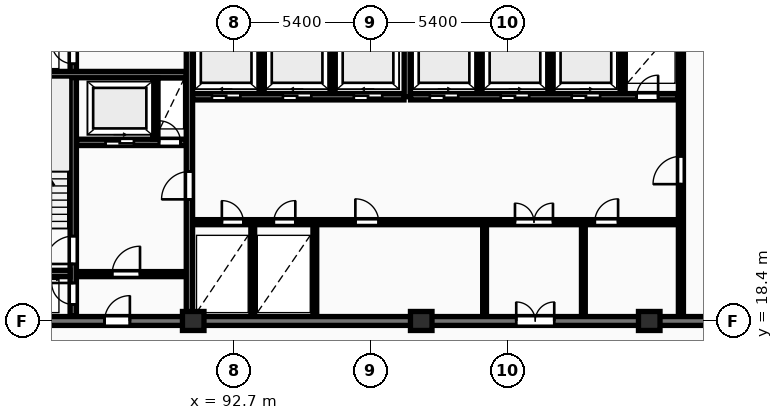
"""IFC4 building model, lengths in metres.
Left out: names, types, materials, properties, quantities, classifications, styles, units other than length and angle.
Written with IfcOpenShell. Run it as: python <this file> out.ifc"""

import sys

from ifc_helpers import new_model, si_unit, direction, frame, frame_2d, origin, origin_2d, place, context, subcontext, project, spatial, rectangle, extrude, element, fill, save


model = new_model("IFC4")
c1 = context("Model", 3, precision=1e-05, world=origin(), true_north=direction((0.0, 1.0)))
c2 = subcontext(c1, "Body", "Model", "MODEL_VIEW")
j1 = project(units=[si_unit("LENGTHUNIT", "METRE"), si_unit("PLANEANGLEUNIT", "RADIAN")], contexts=[c1])
p1 = place(None, origin())
s1 = spatial("IfcSite", under=j1, at=p1, CompositionType="ELEMENT")
p2 = place(p1, origin())
s2 = spatial("IfcBuilding", under=s1, at=p2, CompositionType="ELEMENT")
p3 = place(p2, frame((0.0, 0.0, 93.8)))
s3 = spatial("IfcBuildingStorey", under=s2, at=p3, CompositionType="ELEMENT", Elevation=93.8)
for number, where, z_axis, x_axis in (
    (1, (91.1, 18.4, 0.0), (0.0, 0.0, 1.0), (1.0, 0.0, 0.0)),
    (2, (100.1, 18.4, 0.0), (0.0, 0.0, 1.0), (1.0, 0.0, 0.0)),
    (3, (109.1, 18.4, 0.0), (0.0, 0.0, 1.0), (1.0, 0.0, 0.0)),
):
    element("IfcColumn", number, at=place(p3, frame(where, z_axis=z_axis, x_axis=x_axis)), inside=s3, PredefinedType="COLUMN", context=c2, shape_type="SweptSolid", body=[
        extrude(rectangle(XDim=0.85, YDim=0.75, at=origin_2d()), origin(), (0.0, 0.0, 1.0), 3.25),
    ])
p4 = place(p3, frame((81.925, 18.4, 0.0), z_axis=(0.0, 0.0, 1.0), x_axis=(1.0, 0.0, 0.0)))
e4 = element("IfcWall", 4, at=p4, inside=s3, PredefinedType="SHEAR", context=c2, shape_type="SweptSolid", body=[
    extrude(rectangle(XDim=36.265, YDim=0.35, at=frame_2d((18.132, 0.0))), origin(), (0.0, 0.0, 1.0), 3.25),
])
p5 = place(p4, frame((5.675, 0.0, 0.0)))
e5 = element("IfcOpeningElement", 5, at=p5, cuts=e4, PredefinedType="OPENING", context=c2, shape_type="SweptSolid", body=[
    extrude(rectangle(XDim=1.0, YDim=2.15, at=frame_2d((0.5, 1.075))), frame((0.0, 0.185, 0.0), z_axis=(0.0, -1.0, 0.0), x_axis=(1.0, 0.0, 0.0)), (0.0, 0.0, 1.0), 0.37),
])
p6 = place(p4, frame((21.925, 0.0, 0.0)))
e6 = element("IfcOpeningElement", 6, at=p6, cuts=e4, PredefinedType="OPENING", context=c2, shape_type="SweptSolid", body=[
    extrude(rectangle(XDim=1.5, YDim=2.2, at=frame_2d((0.75, 1.1))), frame((0.0, 0.185, 0.0), z_axis=(0.0, -1.0, 0.0), x_axis=(1.0, 0.0, 0.0)), (0.0, 0.0, 1.0), 0.37),
])
p7 = place(p4, frame((29.875, 0.0, 0.0)))
e7 = element("IfcOpeningElement", 7, at=p7, cuts=e4, PredefinedType="OPENING", context=c2, shape_type="SweptSolid", body=[
    extrude(rectangle(XDim=1.0, YDim=2.15, at=frame_2d((0.5, 1.075))), frame((0.0, 0.185, 0.0), z_axis=(0.0, -1.0, 0.0), x_axis=(1.0, 0.0, 0.0)), (0.0, 0.0, 1.0), 0.37),
])
p8 = place(p3, frame((86.365, 18.6, 0.0), z_axis=(0.0, 0.0, 1.0), x_axis=(0.0, 1.0, 0.0)))
e8 = element("IfcWall", 8, at=p8, inside=s3, PredefinedType="SHEAR", context=c2, shape_type="SweptSolid", body=[
    extrude(rectangle(XDim=11.6, YDim=0.25, at=frame_2d((5.8, 0.0))), origin(), (0.0, 0.0, 1.0), 3.25),
])
p9 = place(p8, frame((0.45, 0.0, 0.0)))
e9 = element("IfcOpeningElement", 9, at=p9, cuts=e8, PredefinedType="OPENING", context=c2, shape_type="SweptSolid", body=[
    extrude(rectangle(XDim=0.85, YDim=2.05, at=frame_2d((0.425, 1.025))), frame((0.0, 0.135, 0.0), z_axis=(0.0, -1.0, 0.0), x_axis=(1.0, 0.0, 0.0)), (0.0, 0.0, 1.0), 0.27),
])
p10 = place(p8, frame((2.05, 0.0, 0.0)))
e10 = element("IfcOpeningElement", 10, at=p10, cuts=e8, PredefinedType="OPENING", context=c2, shape_type="SweptSolid", body=[
    extrude(rectangle(XDim=1.1, YDim=2.1, at=frame_2d((0.55, 1.05))), frame((0.0, 0.135, 0.0), z_axis=(0.0, -1.0, 0.0), x_axis=(1.0, 0.0, 0.0)), (0.0, 0.0, 1.0), 0.27),
])
p11 = place(p8, frame((9.95, 0.0, 0.0)))
e11 = element("IfcOpeningElement", 11, at=p11, cuts=e8, PredefinedType="OPENING", context=c2, shape_type="SweptSolid", body=[
    extrude(rectangle(XDim=0.85, YDim=2.05, at=frame_2d((0.425, 1.025))), frame((0.0, 0.135, 0.0), z_axis=(0.0, -1.0, 0.0), x_axis=(1.0, 0.0, 0.0)), (0.0, 0.0, 1.0), 0.27),
])
p12 = place(p3, frame((83.0, 20.275, 0.0), z_axis=(0.0, 0.0, 1.0), x_axis=(1.0, 0.0, 0.0)))
e12 = element("IfcWall", 12, at=p12, inside=s3, PredefinedType="SHEAR", context=c2, shape_type="SweptSolid", body=[
    extrude(rectangle(XDim=3.24, YDim=0.25, at=frame_2d((1.62, 0.0))), origin(), (0.0, 0.0, 1.0), 3.25),
])
p13 = place(p3, frame((83.0, 28.125, 0.0), z_axis=(0.0, 0.0, 1.0), x_axis=(1.0, 0.0, 0.0)))
e13 = element("IfcWall", 13, at=p13, inside=s3, PredefinedType="SHEAR", context=c2, shape_type="SweptSolid", body=[
    extrude(rectangle(XDim=7.82, YDim=0.25, at=frame_2d((3.91, 0.0))), origin(), (0.0, 0.0, 1.0), 3.25),
])
p14 = place(p3, frame((86.5, 25.45, 0.0), z_axis=(0.0, 0.0, 1.0), x_axis=(1.0, 0.0, 0.0)))
e14 = element("IfcWall", 14, at=p14, inside=s3, PredefinedType="SHEAR", context=c2, shape_type="SweptSolid", body=[
    extrude(rectangle(XDim=4.32, YDim=0.25, at=frame_2d((2.16, 0.0))), origin(), (0.0, 0.0, 1.0), 3.25),
])
p15 = place(p14, frame((1.14, 0.0, 0.0)))
e15 = element("IfcOpeningElement", 15, at=p15, cuts=e14, PredefinedType="OPENING", context=c2, shape_type="SweptSolid", body=[
    extrude(rectangle(XDim=1.12, YDim=2.12, at=frame_2d((0.56, 1.06))), frame((0.0, 0.135, 0.0), z_axis=(0.0, -1.0, 0.0), x_axis=(1.0, 0.0, 0.0)), (0.0, 0.0, 1.0), 0.27),
])
p16 = place(p14, frame((3.25, 0.0, 0.0)))
e16 = element("IfcOpeningElement", 16, at=p16, cuts=e14, PredefinedType="OPENING", context=c2, shape_type="SweptSolid", body=[
    extrude(rectangle(XDim=0.85, YDim=2.05, at=frame_2d((0.425, 1.025))), frame((0.0, 0.135, 0.0), z_axis=(0.0, -1.0, 0.0), x_axis=(1.0, 0.0, 0.0)), (0.0, 0.0, 1.0), 0.27),
])
p17 = place(p3, frame((89.6, 25.58, 0.0), z_axis=(0.0, 0.0, 1.0), x_axis=(0.0, 1.0, 0.0)))
e17 = element("IfcWall", 17, at=p17, inside=s3, PredefinedType="PARTITIONING", context=c2, shape_type="SweptSolid", body=[
    extrude(rectangle(XDim=2.42, YDim=0.2, at=frame_2d((1.21, 0.0))), origin(), (0.0, 0.0, 1.0), 2.97),
])
p18 = place(p3, frame((86.5, 20.25, 0.0), z_axis=(0.0, 0.0, 1.0), x_axis=(1.0, 0.0, 0.0)))
e18 = element("IfcWall", 18, at=p18, inside=s3, PredefinedType="PARTITIONING", context=c2, shape_type="SweptSolid", body=[
    extrude(rectangle(XDim=4.32, YDim=0.2, at=frame_2d((2.16, 0.0))), origin(), (0.0, 0.0, 1.0), 2.97),
])
p19 = place(p18, frame((1.4, 0.0, 0.0)))
e19 = element("IfcOpeningElement", 19, at=p19, cuts=e18, PredefinedType="OPENING", context=c2, shape_type="SweptSolid", body=[
    extrude(rectangle(XDim=1.1, YDim=2.1, at=frame_2d((0.55, 1.05))), frame((0.0, 0.11, 0.0), z_axis=(0.0, -1.0, 0.0), x_axis=(1.0, 0.0, 0.0)), (0.0, 0.0, 1.0), 0.22),
])
p20 = place(p3, frame((90.95, 18.6, 0.0), z_axis=(0.0, 0.0, 1.0), x_axis=(0.0, 1.0, 0.0)))
e20 = element("IfcWall", 20, at=p20, inside=s3, PredefinedType="SHEAR", context=c2, shape_type="SweptSolid", body=[
    extrude(rectangle(XDim=11.6, YDim=0.25, at=frame_2d((5.8, 0.0))), origin(), (0.0, 0.0, 1.0), 3.25),
])
p21 = place(p20, frame((4.6, 0.0, 0.0)))
e21 = element("IfcOpeningElement", 21, at=p21, cuts=e20, PredefinedType="OPENING", context=c2, shape_type="SweptSolid", body=[
    extrude(rectangle(XDim=1.1, YDim=2.1, at=frame_2d((0.55, 1.05))), frame((0.0, 0.135, 0.0), z_axis=(0.0, -1.0, 0.0), x_axis=(1.0, 0.0, 0.0)), (0.0, 0.0, 1.0), 0.27),
])
for number, where, z_axis, x_axis in (
    (22, (93.8, 27.38, 0.0), (0.0, 0.0, 1.0), (0.0, 1.0, 0.0)),
    (23, (96.6, 27.38, 0.0), (0.0, 0.0, 1.0), (0.0, 1.0, 0.0)),
):
    element("IfcWall", number, at=place(p3, frame(where, z_axis=z_axis, x_axis=x_axis)), inside=s3, PredefinedType="PARTITIONING", context=c2, shape_type="SweptSolid", body=[
        extrude(rectangle(XDim=2.82, YDim=0.2, at=frame_2d((1.41, 0.0))), origin(), (0.0, 0.0, 1.0), 2.97),
    ])
p22 = place(p3, frame((91.08, 27.25, 0.0), z_axis=(0.0, 0.0, 1.0), x_axis=(1.0, 0.0, 0.0)))
e24 = element("IfcWall", 24, at=p22, inside=s3, PredefinedType="SHEAR", context=c2, shape_type="SweptSolid", body=[
    extrude(rectangle(XDim=8.34, YDim=0.25, at=frame_2d((4.17, 0.0))), origin(), (0.0, 0.0, 1.0), 3.25),
])
p23 = place(p22, frame((0.76, 0.0, 0.0)))
e25 = element("IfcOpeningElement", 25, at=p23, cuts=e24, PredefinedType="OPENING", context=c2, shape_type="SweptSolid", body=[
    extrude(rectangle(XDim=1.12, YDim=2.12, at=frame_2d((0.56, 1.06))), frame((0.0, 0.135, 0.0), z_axis=(0.0, -1.0, 0.0), x_axis=(1.0, 0.0, 0.0)), (0.0, 0.0, 1.0), 0.27),
])
p24 = place(p22, frame((3.56, 0.0, 0.0)))
e26 = element("IfcOpeningElement", 26, at=p24, cuts=e24, PredefinedType="OPENING", context=c2, shape_type="SweptSolid", body=[
    extrude(rectangle(XDim=1.12, YDim=2.12, at=frame_2d((0.56, 1.06))), frame((0.0, 0.135, 0.0), z_axis=(0.0, -1.0, 0.0), x_axis=(1.0, 0.0, 0.0)), (0.0, 0.0, 1.0), 0.27),
])
p25 = place(p22, frame((6.36, 0.0, 0.0)))
e27 = element("IfcOpeningElement", 27, at=p25, cuts=e24, PredefinedType="OPENING", context=c2, shape_type="SweptSolid", body=[
    extrude(rectangle(XDim=1.12, YDim=2.12, at=frame_2d((0.56, 1.06))), frame((0.0, 0.135, 0.0), z_axis=(0.0, -1.0, 0.0), x_axis=(1.0, 0.0, 0.0)), (0.0, 0.0, 1.0), 0.27),
])
p26 = place(p3, frame((99.55, 27.25, 0.0), z_axis=(0.0, 0.0, 1.0), x_axis=(0.0, 1.0, 0.0)))
e28 = element("IfcWall", 28, at=p26, inside=s3, PredefinedType="SHEAR", context=c2, shape_type="SweptSolid", body=[
    extrude(rectangle(XDim=2.95, YDim=0.25, at=frame_2d((1.475, 0.0))), origin(), (0.0, 0.0, 1.0), 3.25),
])
for number, where, z_axis, x_axis in (
    (29, (102.4, 27.38, 0.0), (0.0, 0.0, 1.0), (0.0, 1.0, 0.0)),
    (30, (105.2, 27.38, 0.0), (0.0, 0.0, 1.0), (0.0, 1.0, 0.0)),
    (31, (108.05, 27.38, 0.0), (0.0, 0.0, 1.0), (0.0, 1.0, 0.0)),
):
    element("IfcWall", number, at=place(p3, frame(where, z_axis=z_axis, x_axis=x_axis)), inside=s3, PredefinedType="PARTITIONING", context=c2, shape_type="SweptSolid", body=[
        extrude(rectangle(XDim=2.82, YDim=0.2, at=frame_2d((1.41, 0.0))), origin(), (0.0, 0.0, 1.0), 2.97),
    ])
p27 = place(p3, frame((99.68, 27.25, 0.0), z_axis=(0.0, 0.0, 1.0), x_axis=(1.0, 0.0, 0.0)))
e32 = element("IfcWall", 32, at=p27, inside=s3, PredefinedType="SHEAR", context=c2, shape_type="SweptSolid", body=[
    extrude(rectangle(XDim=10.54, YDim=0.25, at=frame_2d((5.27, 0.0))), origin(), (0.0, 0.0, 1.0), 3.25),
])
p28 = place(p27, frame((0.76, 0.0, 0.0)))
e33 = element("IfcOpeningElement", 33, at=p28, cuts=e32, PredefinedType="OPENING", context=c2, shape_type="SweptSolid", body=[
    extrude(rectangle(XDim=1.12, YDim=2.12, at=frame_2d((0.56, 1.06))), frame((0.0, 0.135, 0.0), z_axis=(0.0, -1.0, 0.0), x_axis=(1.0, 0.0, 0.0)), (0.0, 0.0, 1.0), 0.27),
])
p29 = place(p27, frame((3.56, 0.0, 0.0)))
e34 = element("IfcOpeningElement", 34, at=p29, cuts=e32, PredefinedType="OPENING", context=c2, shape_type="SweptSolid", body=[
    extrude(rectangle(XDim=1.12, YDim=2.12, at=frame_2d((0.56, 1.06))), frame((0.0, 0.135, 0.0), z_axis=(0.0, -1.0, 0.0), x_axis=(1.0, 0.0, 0.0)), (0.0, 0.0, 1.0), 0.27),
])
p30 = place(p27, frame((6.36, 0.0, 0.0)))
e35 = element("IfcOpeningElement", 35, at=p30, cuts=e32, PredefinedType="OPENING", context=c2, shape_type="SweptSolid", body=[
    extrude(rectangle(XDim=1.12, YDim=2.12, at=frame_2d((0.56, 1.06))), frame((0.0, 0.135, 0.0), z_axis=(0.0, -1.0, 0.0), x_axis=(1.0, 0.0, 0.0)), (0.0, 0.0, 1.0), 0.27),
])
p31 = place(p27, frame((8.92, 0.0, 0.0)))
e36 = element("IfcOpeningElement", 36, at=p31, cuts=e32, PredefinedType="OPENING", context=c2, shape_type="SweptSolid", body=[
    extrude(rectangle(XDim=0.85, YDim=2.05, at=frame_2d((0.425, 1.025))), frame((0.0, 0.135, 0.0), z_axis=(0.0, -1.0, 0.0), x_axis=(1.0, 0.0, 0.0)), (0.0, 0.0, 1.0), 0.27),
])
for number, where, z_axis, x_axis in (
    (37, (93.45, 18.6, 0.0), (0.0, 0.0, 1.0), (0.0, 1.0, 0.0)),
    (38, (95.9, 18.6, 0.0), (0.0, 0.0, 1.0), (0.0, 1.0, 0.0)),
    (39, (102.6, 18.6, 0.0), (0.0, 0.0, 1.0), (0.0, 1.0, 0.0)),
    (40, (106.5, 18.6, 0.0), (0.0, 0.0, 1.0), (0.0, 1.0, 0.0)),
):
    element("IfcWall", number, at=place(p3, frame(where, z_axis=z_axis, x_axis=x_axis)), inside=s3, PredefinedType="PARTITIONING", context=c2, shape_type="SweptSolid", body=[
        extrude(rectangle(XDim=3.6, YDim=0.15, at=frame_2d((1.8, 0.0))), origin(), (0.0, 0.0, 1.0), 2.97),
    ])
p32 = place(p3, frame((91.08, 22.3, 0.0), z_axis=(0.0, 0.0, 1.0), x_axis=(1.0, 0.0, 0.0)))
e41 = element("IfcWall", 41, at=p32, inside=s3, PredefinedType="PARTITIONING", context=c2, shape_type="SweptSolid", body=[
    extrude(rectangle(XDim=19.14, YDim=0.2, at=frame_2d((9.57, 0.0))), origin(), (0.0, 0.0, 1.0), 2.97),
])
p33 = place(p32, frame((1.15, 0.0, 0.0)))
e42 = element("IfcOpeningElement", 42, at=p33, cuts=e41, PredefinedType="OPENING", context=c2, shape_type="SweptSolid", body=[
    extrude(rectangle(XDim=0.85, YDim=2.05, at=frame_2d((0.425, 1.025))), frame((0.0, 0.11, 0.0), z_axis=(0.0, -1.0, 0.0), x_axis=(1.0, 0.0, 0.0)), (0.0, 0.0, 1.0), 0.22),
])
p34 = place(p32, frame((3.2, 0.0, 0.0)))
e43 = element("IfcOpeningElement", 43, at=p34, cuts=e41, PredefinedType="OPENING", context=c2, shape_type="SweptSolid", body=[
    extrude(rectangle(XDim=0.85, YDim=2.05, at=frame_2d((0.425, 1.025))), frame((0.0, 0.11, 0.0), z_axis=(0.0, -1.0, 0.0), x_axis=(1.0, 0.0, 0.0)), (0.0, 0.0, 1.0), 0.22),
])
p35 = place(p32, frame((12.72, 0.0, 0.0)))
e44 = element("IfcOpeningElement", 44, at=p35, cuts=e41, PredefinedType="OPENING", context=c2, shape_type="SweptSolid", body=[
    extrude(rectangle(XDim=1.5, YDim=2.2, at=frame_2d((0.75, 1.1))), frame((0.0, 0.11, 0.0), z_axis=(0.0, -1.0, 0.0), x_axis=(1.0, 0.0, 0.0)), (0.0, 0.0, 1.0), 0.22),
])
p36 = place(p32, frame((6.42, 0.0, 0.0)))
e45 = element("IfcOpeningElement", 45, at=p36, cuts=e41, PredefinedType="OPENING", context=c2, shape_type="SweptSolid", body=[
    extrude(rectangle(XDim=0.92, YDim=2.08, at=frame_2d((0.46, 1.04))), frame((0.0, 0.11, 0.0), z_axis=(0.0, -1.0, 0.0), x_axis=(1.0, 0.0, 0.0)), (0.0, 0.0, 1.0), 0.22),
])
p37 = place(p32, frame((15.87, 0.0, 0.0)))
e46 = element("IfcOpeningElement", 46, at=p37, cuts=e41, PredefinedType="OPENING", context=c2, shape_type="SweptSolid", body=[
    extrude(rectangle(XDim=0.92, YDim=2.08, at=frame_2d((0.46, 1.04))), frame((0.0, 0.11, 0.0), z_axis=(0.0, -1.0, 0.0), x_axis=(1.0, 0.0, 0.0)), (0.0, 0.0, 1.0), 0.22),
])
p38 = place(p3, frame((110.35, 18.6, 0.0), z_axis=(0.0, 0.0, 1.0), x_axis=(0.0, 1.0, 0.0)))
e47 = element("IfcWall", 47, at=p38, inside=s3, PredefinedType="PARTITIONING", context=c2, shape_type="SweptSolid", body=[
    extrude(rectangle(XDim=11.6, YDim=0.2, at=frame_2d((5.8, 0.0))), origin(), (0.0, 0.0, 1.0), 2.97),
])
p39 = place(p38, frame((5.2, 0.0, 0.0)))
e48 = element("IfcOpeningElement", 48, at=p39, cuts=e47, PredefinedType="OPENING", context=c2, shape_type="SweptSolid", body=[
    extrude(rectangle(XDim=1.1, YDim=2.15, at=frame_2d((0.55, 1.075))), frame((0.0, 0.11, 0.0), z_axis=(0.0, -1.0, 0.0), x_axis=(1.0, 0.0, 0.0)), (0.0, 0.0, 1.0), 0.22),
])
p40 = place(p5, origin())
e49 = element("IfcDoor", 49, at=p40, inside=s3, OperationType="SINGLE_SWING_RIGHT", PredefinedType="DOOR", context=c2, shape_type="SweptSolid", body=[
    extrude(rectangle(XDim=1.0, YDim=2.15, at=frame_2d((0.5, 1.075))), frame((0.0, 0.025, 0.0), z_axis=(0.0, -1.0, 0.0), x_axis=(1.0, 0.0, 0.0)), (0.0, 0.0, 1.0), 0.05),
])
fill(e5, e49)
p41 = place(p6, origin())
e50 = element("IfcDoor", 50, at=p41, inside=s3, OperationType="DOUBLE_DOOR_SINGLE_SWING", PredefinedType="DOOR", context=c2, shape_type="SweptSolid", body=[
    extrude(rectangle(XDim=1.5, YDim=2.2, at=frame_2d((0.75, 1.1))), frame((0.0, 0.025, 0.0), z_axis=(0.0, -1.0, 0.0), x_axis=(1.0, 0.0, 0.0)), (0.0, 0.0, 1.0), 0.05),
])
fill(e6, e50)
p42 = place(p9, origin())
e51 = element("IfcDoor", 51, at=p42, inside=s3, OperationType="SINGLE_SWING_RIGHT", PredefinedType="DOOR", context=c2, shape_type="SweptSolid", body=[
    extrude(rectangle(XDim=0.85, YDim=2.05, at=frame_2d((0.425, 1.025))), frame((0.0, 0.025, 0.0), z_axis=(0.0, -1.0, 0.0), x_axis=(1.0, 0.0, 0.0)), (0.0, 0.0, 1.0), 0.05),
])
fill(e9, e51)
p43 = place(p10, origin())
e52 = element("IfcDoor", 52, at=p43, inside=s3, OperationType="SINGLE_SWING_LEFT", PredefinedType="DOOR", context=c2, shape_type="SweptSolid", body=[
    extrude(rectangle(XDim=1.1, YDim=2.1, at=frame_2d((0.55, 1.05))), frame((0.0, 0.025, 0.0), z_axis=(0.0, -1.0, 0.0), x_axis=(1.0, 0.0, 0.0)), (0.0, 0.0, 1.0), 0.05),
])
fill(e10, e52)
p44 = place(p11, origin())
e53 = element("IfcDoor", 53, at=p44, inside=s3, OperationType="SINGLE_SWING_RIGHT", PredefinedType="DOOR", context=c2, shape_type="SweptSolid", body=[
    extrude(rectangle(XDim=0.85, YDim=2.05, at=frame_2d((0.425, 1.025))), frame((0.0, 0.025, 0.0), z_axis=(0.0, -1.0, 0.0), x_axis=(1.0, 0.0, 0.0)), (0.0, 0.0, 1.0), 0.05),
])
fill(e11, e53)
p45 = place(p15, origin())
e54 = element("IfcDoor", 54, at=p45, inside=s3, OperationType="SLIDING_TO_RIGHT", PredefinedType="DOOR", context=c2, shape_type="SweptSolid", body=[
    extrude(rectangle(XDim=1.12, YDim=2.12, at=frame_2d((0.56, 1.06))), frame((0.0, 0.025, 0.0), z_axis=(0.0, -1.0, 0.0), x_axis=(1.0, 0.0, 0.0)), (0.0, 0.0, 1.0), 0.05),
])
fill(e15, e54)
p46 = place(p16, origin())
e55 = element("IfcDoor", 55, at=p46, inside=s3, OperationType="SINGLE_SWING_LEFT", PredefinedType="DOOR", context=c2, shape_type="SweptSolid", body=[
    extrude(rectangle(XDim=0.85, YDim=2.05, at=frame_2d((0.425, 1.025))), frame((0.0, 0.025, 0.0), z_axis=(0.0, -1.0, 0.0), x_axis=(1.0, 0.0, 0.0)), (0.0, 0.0, 1.0), 0.05),
])
fill(e16, e55)
p47 = place(p19, origin())
e56 = element("IfcDoor", 56, at=p47, inside=s3, OperationType="SINGLE_SWING_RIGHT", PredefinedType="DOOR", context=c2, shape_type="SweptSolid", body=[
    extrude(rectangle(XDim=1.1, YDim=2.1, at=frame_2d((0.55, 1.05))), frame((0.0, 0.025, 0.0), z_axis=(0.0, -1.0, 0.0), x_axis=(1.0, 0.0, 0.0)), (0.0, 0.0, 1.0), 0.05),
])
fill(e19, e56)
p48 = place(p21, origin())
e57 = element("IfcDoor", 57, at=p48, inside=s3, OperationType="SINGLE_SWING_LEFT", PredefinedType="DOOR", context=c2, shape_type="SweptSolid", body=[
    extrude(rectangle(XDim=1.1, YDim=2.1, at=frame_2d((0.55, 1.05))), frame((0.0, 0.025, 0.0), z_axis=(0.0, -1.0, 0.0), x_axis=(1.0, 0.0, 0.0)), (0.0, 0.0, 1.0), 0.05),
])
fill(e21, e57)
p49 = place(p23, origin())
e58 = element("IfcDoor", 58, at=p49, inside=s3, OperationType="SLIDING_TO_LEFT", PredefinedType="DOOR", context=c2, shape_type="SweptSolid", body=[
    extrude(rectangle(XDim=1.12, YDim=2.12, at=frame_2d((0.56, 1.06))), frame((0.0, 0.025, 0.0), z_axis=(0.0, -1.0, 0.0), x_axis=(1.0, 0.0, 0.0)), (0.0, 0.0, 1.0), 0.05),
])
fill(e25, e58)
p50 = place(p24, origin())
e59 = element("IfcDoor", 59, at=p50, inside=s3, OperationType="SLIDING_TO_LEFT", PredefinedType="DOOR", context=c2, shape_type="SweptSolid", body=[
    extrude(rectangle(XDim=1.12, YDim=2.12, at=frame_2d((0.56, 1.06))), frame((0.0, 0.025, 0.0), z_axis=(0.0, -1.0, 0.0), x_axis=(1.0, 0.0, 0.0)), (0.0, 0.0, 1.0), 0.05),
])
fill(e26, e59)
p51 = place(p25, origin())
e60 = element("IfcDoor", 60, at=p51, inside=s3, OperationType="SLIDING_TO_LEFT", PredefinedType="DOOR", context=c2, shape_type="SweptSolid", body=[
    extrude(rectangle(XDim=1.12, YDim=2.12, at=frame_2d((0.56, 1.06))), frame((0.0, 0.025, 0.0), z_axis=(0.0, -1.0, 0.0), x_axis=(1.0, 0.0, 0.0)), (0.0, 0.0, 1.0), 0.05),
])
fill(e27, e60)
p52 = place(p28, origin())
e61 = element("IfcDoor", 61, at=p52, inside=s3, OperationType="SLIDING_TO_RIGHT", PredefinedType="DOOR", context=c2, shape_type="SweptSolid", body=[
    extrude(rectangle(XDim=1.12, YDim=2.12, at=frame_2d((0.56, 1.06))), frame((0.0, 0.025, 0.0), z_axis=(0.0, -1.0, 0.0), x_axis=(1.0, 0.0, 0.0)), (0.0, 0.0, 1.0), 0.05),
])
fill(e33, e61)
p53 = place(p29, origin())
e62 = element("IfcDoor", 62, at=p53, inside=s3, OperationType="SLIDING_TO_RIGHT", PredefinedType="DOOR", context=c2, shape_type="SweptSolid", body=[
    extrude(rectangle(XDim=1.12, YDim=2.12, at=frame_2d((0.56, 1.06))), frame((0.0, 0.025, 0.0), z_axis=(0.0, -1.0, 0.0), x_axis=(1.0, 0.0, 0.0)), (0.0, 0.0, 1.0), 0.05),
])
fill(e34, e62)
p54 = place(p30, origin())
e63 = element("IfcDoor", 63, at=p54, inside=s3, OperationType="SLIDING_TO_RIGHT", PredefinedType="DOOR", context=c2, shape_type="SweptSolid", body=[
    extrude(rectangle(XDim=1.12, YDim=2.12, at=frame_2d((0.56, 1.06))), frame((0.0, 0.025, 0.0), z_axis=(0.0, -1.0, 0.0), x_axis=(1.0, 0.0, 0.0)), (0.0, 0.0, 1.0), 0.05),
])
fill(e35, e63)
p55 = place(p31, origin())
e64 = element("IfcDoor", 64, at=p55, inside=s3, OperationType="SINGLE_SWING_RIGHT", PredefinedType="DOOR", context=c2, shape_type="SweptSolid", body=[
    extrude(rectangle(XDim=0.85, YDim=2.05, at=frame_2d((0.425, 1.025))), frame((0.0, 0.025, 0.0), z_axis=(0.0, -1.0, 0.0), x_axis=(1.0, 0.0, 0.0)), (0.0, 0.0, 1.0), 0.05),
])
fill(e36, e64)
p56 = place(p33, origin())
e65 = element("IfcDoor", 65, at=p56, inside=s3, OperationType="SINGLE_SWING_LEFT", PredefinedType="DOOR", context=c2, shape_type="SweptSolid", body=[
    extrude(rectangle(XDim=0.85, YDim=2.05, at=frame_2d((0.425, 1.025))), frame((0.0, 0.025, 0.0), z_axis=(0.0, -1.0, 0.0), x_axis=(1.0, 0.0, 0.0)), (0.0, 0.0, 1.0), 0.05),
])
fill(e42, e65)
p57 = place(p34, origin())
e66 = element("IfcDoor", 66, at=p57, inside=s3, OperationType="SINGLE_SWING_RIGHT", PredefinedType="DOOR", context=c2, shape_type="SweptSolid", body=[
    extrude(rectangle(XDim=0.85, YDim=2.05, at=frame_2d((0.425, 1.025))), frame((0.0, 0.025, 0.0), z_axis=(0.0, -1.0, 0.0), x_axis=(1.0, 0.0, 0.0)), (0.0, 0.0, 1.0), 0.05),
])
fill(e43, e66)
p58 = place(p35, origin())
e67 = element("IfcDoor", 67, at=p58, inside=s3, OperationType="DOUBLE_DOOR_SINGLE_SWING", PredefinedType="DOOR", context=c2, shape_type="SweptSolid", body=[
    extrude(rectangle(XDim=1.5, YDim=2.2, at=frame_2d((0.75, 1.1))), frame((0.0, 0.025, 0.0), z_axis=(0.0, -1.0, 0.0), x_axis=(1.0, 0.0, 0.0)), (0.0, 0.0, 1.0), 0.05),
])
fill(e44, e67)
p59 = place(p36, origin())
e68 = element("IfcDoor", 68, at=p59, inside=s3, OperationType="SINGLE_SWING_LEFT", PredefinedType="DOOR", context=c2, shape_type="SweptSolid", body=[
    extrude(rectangle(XDim=0.92, YDim=2.08, at=frame_2d((0.46, 1.04))), frame((0.0, 0.025, 0.0), z_axis=(0.0, -1.0, 0.0), x_axis=(1.0, 0.0, 0.0)), (0.0, 0.0, 1.0), 0.05),
])
fill(e45, e68)
p60 = place(p37, origin())
e69 = element("IfcDoor", 69, at=p60, inside=s3, OperationType="SINGLE_SWING_RIGHT", PredefinedType="DOOR", context=c2, shape_type="SweptSolid", body=[
    extrude(rectangle(XDim=0.92, YDim=2.08, at=frame_2d((0.46, 1.04))), frame((0.0, 0.025, 0.0), z_axis=(0.0, -1.0, 0.0), x_axis=(1.0, 0.0, 0.0)), (0.0, 0.0, 1.0), 0.05),
])
fill(e46, e69)
p61 = place(p39, origin())
e70 = element("IfcDoor", 70, at=p61, inside=s3, OperationType="SINGLE_SWING_LEFT", PredefinedType="DOOR", context=c2, shape_type="SweptSolid", body=[
    extrude(rectangle(XDim=1.1, YDim=2.15, at=frame_2d((0.55, 1.075))), frame((0.0, 0.025, 0.0), z_axis=(0.0, -1.0, 0.0), x_axis=(1.0, 0.0, 0.0)), (0.0, 0.0, 1.0), 0.05),
])
fill(e48, e70)
save(model, sys.argv[1])
